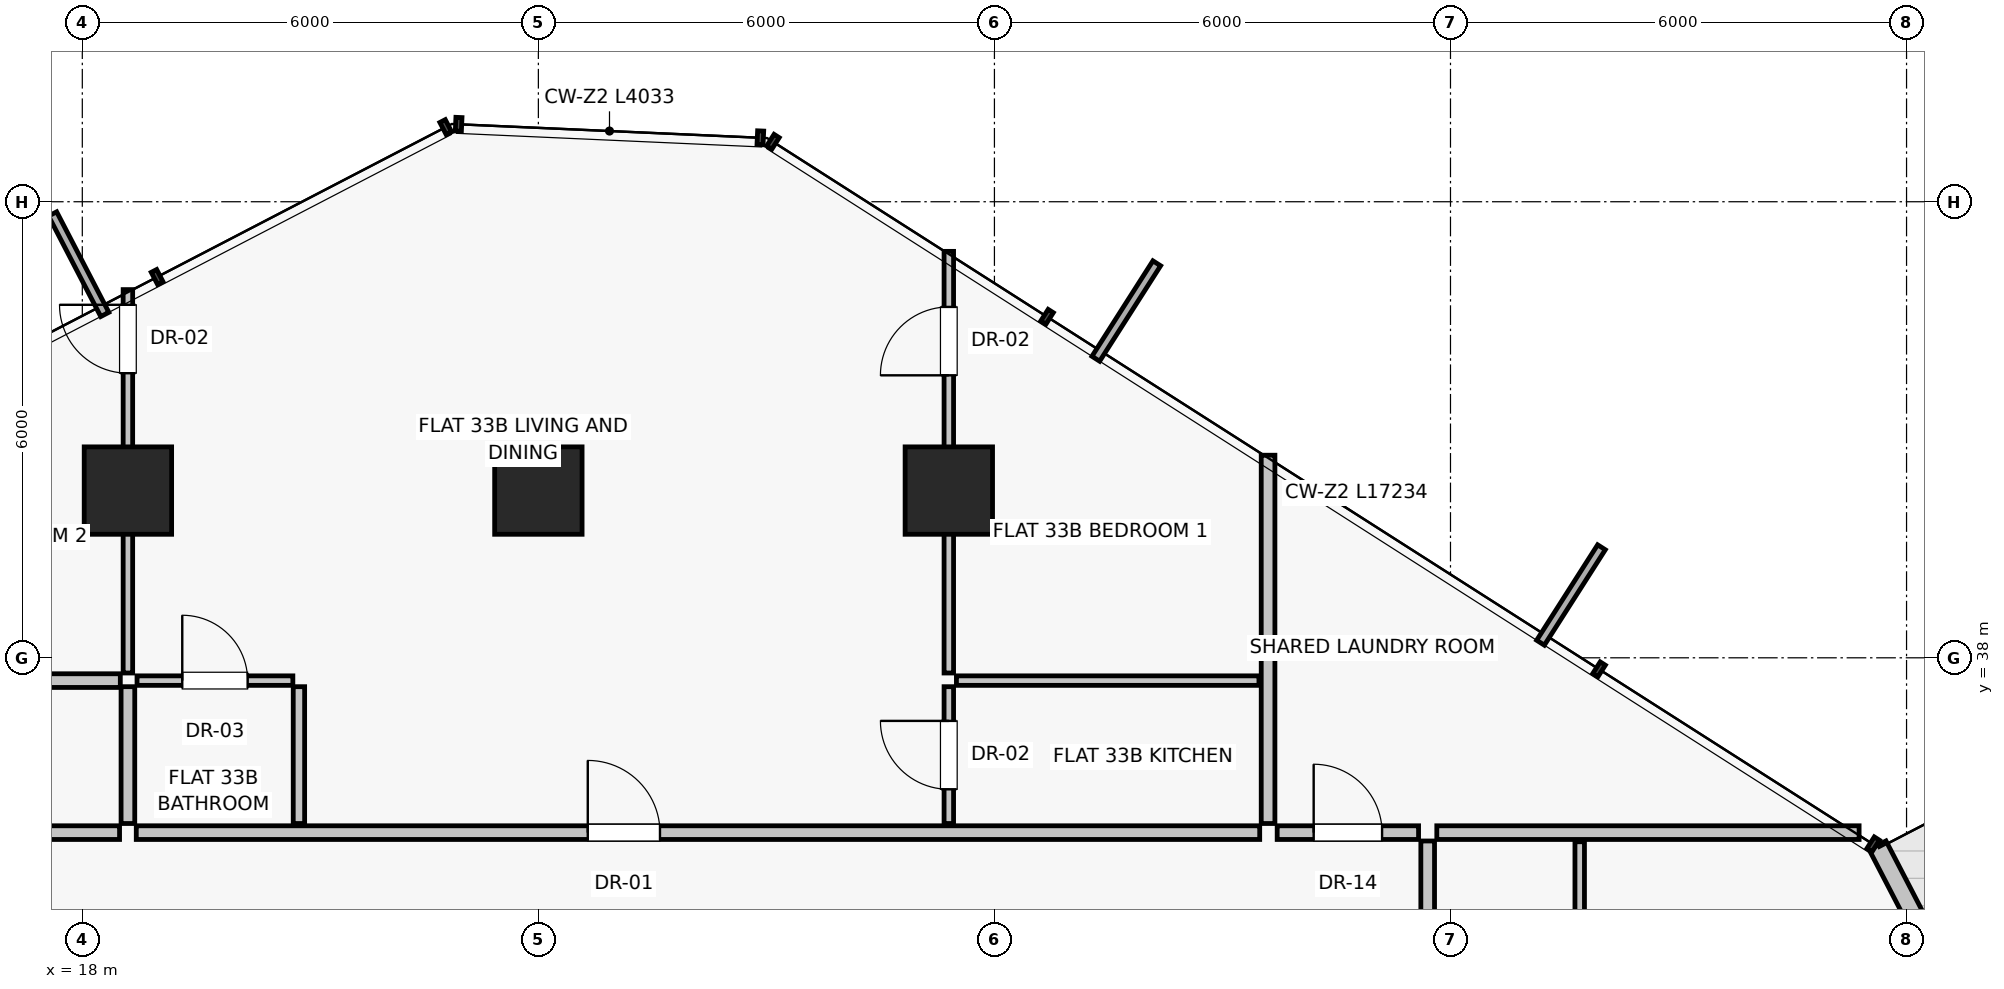
"""IFC4 building model, lengths in metres.
Left out: names, types, materials, properties, quantities, classifications, styles, units other than length and angle.
Written with IfcOpenShell. Run it as: python <this file> out.ifc"""

import sys

from ifc_helpers import new_model, si_unit, direction, frame, frame_2d, origin, origin_2d, place, context, subcontext, project, spatial, rectangle, extrude, source, transform, mapped, element, fill, save


model = new_model("IFC4")
c1 = context("Model", 3, precision=1e-05, world=origin(), true_north=direction((0.0, 1.0)))
c2 = subcontext(c1, "Body", "Model", "MODEL_VIEW")
j1 = project(units=[si_unit("LENGTHUNIT", "METRE"), si_unit("PLANEANGLEUNIT", "RADIAN")], contexts=[c1])
p1 = place(None, origin())
s1 = spatial("IfcSite", under=j1, at=p1, CompositionType="ELEMENT")
p2 = place(p1, origin())
s2 = spatial("IfcBuilding", under=s1, at=p2, CompositionType="ELEMENT")
p3 = place(p2, frame((0.0, 0.0, 119.75)))
s3 = spatial("IfcBuildingStorey", under=s2, at=p3, CompositionType="ELEMENT", Elevation=119.75)
for number, where, z_axis, x_axis in (
    (1, (29.4, 40.2, 0.0), (0.0, 0.0, 1.0), (1.0, 0.0, 0.0)),
    (2, (24.0, 40.2, 0.0), (0.0, 0.0, 1.0), (1.0, 0.0, 0.0)),
    (3, (18.6, 40.2, 0.0), (0.0, 0.0, 1.0), (1.0, 0.0, 0.0)),
):
    element("IfcColumn", number, at=place(p3, frame(where, z_axis=z_axis, x_axis=x_axis)), inside=s3, PredefinedType="COLUMN", context=c2, shape_type="SweptSolid", body=[
        extrude(rectangle(XDim=1.15, YDim=1.15, at=origin_2d()), origin(), (0.0, 0.0, 1.0), 3.25),
    ])
p4 = place(p3, frame((43.569, 31.776, 0.0), z_axis=(0.0, 0.0, 1.0), x_axis=(-0.460795178744, 0.887506508847, 0.0)))
e4 = element("IfcWall", 4, at=p4, inside=s3, PredefinedType="SOLIDWALL", context=c2, shape_type="SweptSolid", body=[
    extrude(rectangle(XDim=4.233, YDim=0.25, at=frame_2d((2.117, 0.0))), origin(), (0.0, 0.0, 1.0), 3.0),
])
p5 = place(p4, frame((1.542, 0.0, 0.0)))
e5 = element("IfcOpeningElement", 5, at=p5, cuts=e4, PredefinedType="OPENING", context=c2, shape_type="SweptSolid", body=[
    extrude(rectangle(XDim=1.15, YDim=2.25, at=frame_2d((0.575, 1.125))), frame((0.0, 0.135, 0.0), z_axis=(0.0, -1.0, 0.0), x_axis=(1.0, 0.0, 0.0)), (0.0, 0.0, 1.0), 0.27),
])
p6 = place(p3, frame((33.6, 35.82, 0.0), z_axis=(0.0, 0.0, 1.0), x_axis=(0.0, 1.0, 0.0)))
e6 = element("IfcWall", 6, at=p6, inside=s3, PredefinedType="PARTITIONING", context=c2, shape_type="SweptSolid", body=[
    extrude(rectangle(XDim=4.845, YDim=0.18, at=frame_2d((2.423, 0.0))), origin(), (0.0, 0.0, 1.0), 3.0),
])
p7 = place(p3, frame((14.51, 35.7, 0.0), z_axis=(0.0, 0.0, 1.0), x_axis=(1.0, 0.0, 0.0)))
e7 = element("IfcWall", 7, at=p7, inside=s3, PredefinedType="PARTITIONING", context=c2, shape_type="SweptSolid", body=[
    extrude(rectangle(XDim=3.98, YDim=0.18, at=frame_2d((1.99, 0.0))), origin(), (0.0, 0.0, 1.0), 2.58),
])
p8 = place(p7, frame((1.49, 0.0, 0.0)))
e8 = element("IfcOpeningElement", 8, at=p8, cuts=e7, PredefinedType="OPENING", context=c2, shape_type="SweptSolid", body=[
    extrude(rectangle(XDim=1.0, YDim=2.01, at=frame_2d((0.5, 1.005))), frame((0.0, 0.1, 0.0), z_axis=(0.0, -1.0, 0.0), x_axis=(1.0, 0.0, 0.0)), (0.0, 0.0, 1.0), 0.2),
])
p9 = place(p3, frame((18.71, 35.7, 0.0), z_axis=(0.0, 0.0, 1.0), x_axis=(1.0, 0.0, 0.0)))
e9 = element("IfcWall", 9, at=p9, inside=s3, PredefinedType="PARTITIONING", context=c2, shape_type="SweptSolid", body=[
    extrude(rectangle(XDim=14.78, YDim=0.18, at=frame_2d((7.39, 0.0))), origin(), (0.0, 0.0, 1.0), 2.58),
])
p10 = place(p9, frame((5.94, 0.0, 0.0)))
e10 = element("IfcOpeningElement", 10, at=p10, cuts=e9, PredefinedType="OPENING", context=c2, shape_type="SweptSolid", body=[
    extrude(rectangle(XDim=0.95, YDim=2.02, at=frame_2d((0.475, 1.01))), frame((0.0, 0.1, 0.0), z_axis=(0.0, -1.0, 0.0), x_axis=(1.0, 0.0, 0.0)), (0.0, 0.0, 1.0), 0.2),
])
p11 = place(p3, frame((14.52, 37.7, 0.0), z_axis=(0.0, 0.0, 1.0), x_axis=(1.0, 0.0, 0.0)))
e11 = element("IfcWall", 11, at=p11, inside=s3, PredefinedType="PARTITIONING", context=c2, shape_type="SweptSolid", body=[
    extrude(rectangle(XDim=3.98, YDim=0.18, at=frame_2d((1.99, 0.0))), origin(), (0.0, 0.0, 1.0), 3.0),
])
p12 = place(p3, frame((18.6, 35.82, 0.0), z_axis=(0.0, 0.0, 1.0), x_axis=(0.0, 1.0, 0.0)))
e12 = element("IfcWall", 12, at=p12, inside=s3, PredefinedType="PARTITIONING", context=c2, shape_type="SweptSolid", body=[
    extrude(rectangle(XDim=1.8, YDim=0.18, at=frame_2d((0.9, 0.0))), origin(), (0.0, 0.0, 1.0), 2.378),
])
p13 = place(p3, frame((18.6, 37.8, 0.0), z_axis=(0.0, 0.0, 1.0), x_axis=(0.0, 1.0, 0.0)))
e13 = element("IfcWall", 13, at=p13, inside=s3, PredefinedType="PARTITIONING", context=c2, shape_type="SweptSolid", body=[
    extrude(rectangle(XDim=5.044, YDim=0.125, at=frame_2d((2.522, 0.0))), origin(), (0.0, 0.0, 1.0), 2.378),
])
p14 = place(p13, frame((3.944, 0.0, 0.0)))
e14 = element("IfcOpeningElement", 14, at=p14, cuts=e13, PredefinedType="OPENING", context=c2, shape_type="SweptSolid", body=[
    extrude(rectangle(XDim=0.9, YDim=2.01, at=frame_2d((0.45, 1.005))), frame((0.0, 0.073, 0.0), z_axis=(0.0, -1.0, 0.0), x_axis=(1.0, 0.0, 0.0)), (0.0, 0.0, 1.0), 0.145),
])
p15 = place(p3, frame((20.85, 35.82, 0.0), z_axis=(0.0, 0.0, 1.0), x_axis=(0.0, 1.0, 0.0)))
e15 = element("IfcWall", 15, at=p15, inside=s3, PredefinedType="PARTITIONING", context=c2, shape_type="SweptSolid", body=[
    extrude(rectangle(XDim=1.8, YDim=0.15, at=frame_2d((0.9, 0.0))), origin(), (0.0, 0.0, 1.0), 3.0),
])
p16 = place(p3, frame((18.72, 37.7, 0.0), z_axis=(0.0, 0.0, 1.0), x_axis=(1.0, 0.0, 0.0)))
e16 = element("IfcWall", 16, at=p16, inside=s3, PredefinedType="PARTITIONING", context=c2, shape_type="SweptSolid", body=[
    extrude(rectangle(XDim=2.05, YDim=0.125, at=frame_2d((1.025, 0.0))), origin(), (0.0, 0.0, 1.0), 3.0),
])
p17 = place(p16, frame((0.595, 0.0, 0.0)))
e17 = element("IfcOpeningElement", 17, at=p17, cuts=e16, PredefinedType="OPENING", context=c2, shape_type="SweptSolid", body=[
    extrude(rectangle(XDim=0.86, YDim=2.01, at=frame_2d((0.43, 1.005))), frame((0.0, 0.073, 0.0), z_axis=(0.0, -1.0, 0.0), x_axis=(1.0, 0.0, 0.0)), (0.0, 0.0, 1.0), 0.145),
])
p18 = place(p3, frame((29.4, 35.82, 0.0), z_axis=(0.0, 0.0, 1.0), x_axis=(0.0, 1.0, 0.0)))
e18 = element("IfcWall", 18, at=p18, inside=s3, PredefinedType="PARTITIONING", context=c2, shape_type="SweptSolid", body=[
    extrude(rectangle(XDim=1.8, YDim=0.125, at=frame_2d((0.9, 0.0))), origin(), (0.0, 0.0, 1.0), 2.378),
])
p19 = place(p18, frame((0.45, 0.0, 0.0)))
e19 = element("IfcOpeningElement", 19, at=p19, cuts=e18, PredefinedType="OPENING", context=c2, shape_type="SweptSolid", body=[
    extrude(rectangle(XDim=0.9, YDim=2.01, at=frame_2d((0.45, 1.005))), frame((0.0, 0.073, 0.0), z_axis=(0.0, -1.0, 0.0), x_axis=(1.0, 0.0, 0.0)), (0.0, 0.0, 1.0), 0.145),
])
p20 = place(p3, frame((29.5, 37.7, 0.0), z_axis=(0.0, 0.0, 1.0), x_axis=(1.0, 0.0, 0.0)))
e20 = element("IfcWall", 20, at=p20, inside=s3, PredefinedType="PARTITIONING", context=c2, shape_type="SweptSolid", body=[
    extrude(rectangle(XDim=3.98, YDim=0.125, at=frame_2d((1.99, 0.0))), origin(), (0.0, 0.0, 1.0), 3.0),
])
p21 = place(p3, frame((29.4, 37.8, 0.0), z_axis=(0.0, 0.0, 1.0), x_axis=(0.0, 1.0, 0.0)))
e21 = element("IfcWall", 21, at=p21, inside=s3, PredefinedType="PARTITIONING", context=c2, shape_type="SweptSolid", body=[
    extrude(rectangle(XDim=5.547, YDim=0.125, at=frame_2d((2.773, 0.0))), origin(), (0.0, 0.0, 1.0), 2.378),
])
p22 = place(p21, frame((3.916, 0.0, 0.0)))
e22 = element("IfcOpeningElement", 22, at=p22, cuts=e21, PredefinedType="OPENING", context=c2, shape_type="SweptSolid", body=[
    extrude(rectangle(XDim=0.9, YDim=2.01, at=frame_2d((0.45, 1.005))), frame((0.0, 0.073, 0.0), z_axis=(0.0, -1.0, 0.0), x_axis=(1.0, 0.0, 0.0)), (0.0, 0.0, 1.0), 0.145),
])
p23 = place(p3, frame((35.82, 35.7, 0.0), z_axis=(0.0, 0.0, 1.0), x_axis=(1.0, 0.0, 0.0)))
e23 = element("IfcWall", 23, at=p23, inside=s3, PredefinedType="PARTITIONING", context=c2, shape_type="SweptSolid", body=[
    extrude(rectangle(XDim=5.556, YDim=0.18, at=frame_2d((2.778, 0.0))), origin(), (0.0, 0.0, 1.0), 3.0),
])
p24 = place(p3, frame((35.7, 18.71, 0.0), z_axis=(0.0, 0.0, 1.0), x_axis=(0.0, 1.0, 0.0)))
e24 = element("IfcWall", 24, at=p24, inside=s3, PredefinedType="PARTITIONING", context=c2, shape_type="SweptSolid", body=[
    extrude(rectangle(XDim=16.88, YDim=0.18, at=frame_2d((8.44, 0.0))), origin(), (0.0, 0.0, 1.0), 2.58),
])
p25 = place(p24, frame((5.94, 0.0, 0.0)))
e25 = element("IfcOpeningElement", 25, at=p25, cuts=e24, PredefinedType="OPENING", context=c2, shape_type="SweptSolid", body=[
    extrude(rectangle(XDim=0.95, YDim=2.02, at=frame_2d((0.475, 1.01))), frame((0.0, 0.1, 0.0), z_axis=(0.0, -1.0, 0.0), x_axis=(1.0, 0.0, 0.0)), (0.0, 0.0, 1.0), 0.2),
])
p26 = place(p3, frame((37.7, 29.5, 0.0), z_axis=(0.0, 0.0, 1.0), x_axis=(0.0, 1.0, 0.0)))
e26 = element("IfcWall", 26, at=p26, inside=s3, PredefinedType="PARTITIONING", context=c2, shape_type="SweptSolid", body=[
    extrude(rectangle(XDim=6.08, YDim=0.125, at=frame_2d((3.04, 0.0))), origin(), (0.0, 0.0, 1.0), 3.0),
])
p27 = place(p3, frame((33.72, 35.7, 0.0), z_axis=(0.0, 0.0, 1.0), x_axis=(1.0, 0.0, 0.0)))
e27 = element("IfcWall", 27, at=p27, inside=s3, PredefinedType="PARTITIONING", context=c2, shape_type="SweptSolid", body=[
    extrude(rectangle(XDim=1.86, YDim=0.18, at=frame_2d((0.93, 0.0))), origin(), (0.0, 0.0, 1.0), 3.0),
])
p28 = place(p27, frame((0.48, 0.0, 0.0)))
e28 = element("IfcOpeningElement", 28, at=p28, cuts=e27, PredefinedType="OPENING", context=c2, shape_type="SweptSolid", body=[
    extrude(rectangle(XDim=0.9, YDim=2.01, at=frame_2d((0.45, 1.005))), frame((0.0, 0.1, 0.0), z_axis=(0.0, -1.0, 0.0), x_axis=(1.0, 0.0, 0.0)), (0.0, 0.0, 1.0), 0.2),
])
m1 = source(origin(), c2, "Body", "SweptSolid", [
    extrude(rectangle(XDim=0.95, YDim=2.02, at=frame_2d((0.475, 1.01))), frame((0.0, 0.025, 0.0), z_axis=(0.0, -1.0, 0.0), x_axis=(1.0, 0.0, 0.0)), (0.0, 0.0, 1.0), 0.05),
])
p29 = place(p10, origin())
e29 = element("IfcDoor", 29, at=p29, inside=s3, OperationType="SINGLE_SWING_LEFT", PredefinedType="DOOR", context=c2, shape_type="MappedRepresentation", body=[
    mapped(m1, transform((0.0, 0.0, 0.0), scale=1.0)),
])
fill(e10, e29)
m2 = source(origin(), c2, "Body", "SweptSolid", [
    extrude(rectangle(XDim=0.9, YDim=2.01, at=frame_2d((0.45, 1.005))), frame((0.0, 0.025, 0.0), z_axis=(0.0, -1.0, 0.0), x_axis=(1.0, 0.0, 0.0)), (0.0, 0.0, 1.0), 0.05),
])
p30 = place(p14, origin())
e30 = element("IfcDoor", 30, at=p30, inside=s3, OperationType="SINGLE_SWING_RIGHT", PredefinedType="DOOR", context=c2, shape_type="MappedRepresentation", body=[
    mapped(m2, transform((0.0, 0.0, 0.0), scale=1.0)),
])
fill(e14, e30)
m3 = source(origin(), c2, "Body", "SweptSolid", [
    extrude(rectangle(XDim=0.86, YDim=2.01, at=frame_2d((0.43, 1.005))), frame((0.0, 0.025, 0.0), z_axis=(0.0, -1.0, 0.0), x_axis=(1.0, 0.0, 0.0)), (0.0, 0.0, 1.0), 0.05),
])
p31 = place(p17, origin())
e31 = element("IfcDoor", 31, at=p31, inside=s3, OperationType="SINGLE_SWING_LEFT", PredefinedType="DOOR", context=c2, shape_type="MappedRepresentation", body=[
    mapped(m3, transform((0.0, 0.0, 0.0), scale=1.0)),
])
fill(e17, e31)
p32 = place(p19, origin())
e32 = element("IfcDoor", 32, at=p32, inside=s3, OperationType="SINGLE_SWING_RIGHT", PredefinedType="DOOR", context=c2, shape_type="MappedRepresentation", body=[
    mapped(m2, transform((0.0, 0.0, 0.0), scale=1.0)),
])
fill(e19, e32)
p33 = place(p22, origin())
e33 = element("IfcDoor", 33, at=p33, inside=s3, OperationType="SINGLE_SWING_LEFT", PredefinedType="DOOR", context=c2, shape_type="MappedRepresentation", body=[
    mapped(m2, transform((0.0, 0.0, 0.0), scale=1.0)),
])
fill(e22, e33)
p34 = place(p28, origin())
e34 = element("IfcDoor", 34, at=p34, inside=s3, OperationType="SINGLE_SWING_LEFT", PredefinedType="DOOR", context=c2, shape_type="MappedRepresentation", body=[
    mapped(m2, transform((0.0, 0.0, 0.0), scale=1.0)),
])
fill(e28, e34)
save(model, sys.argv[1])
